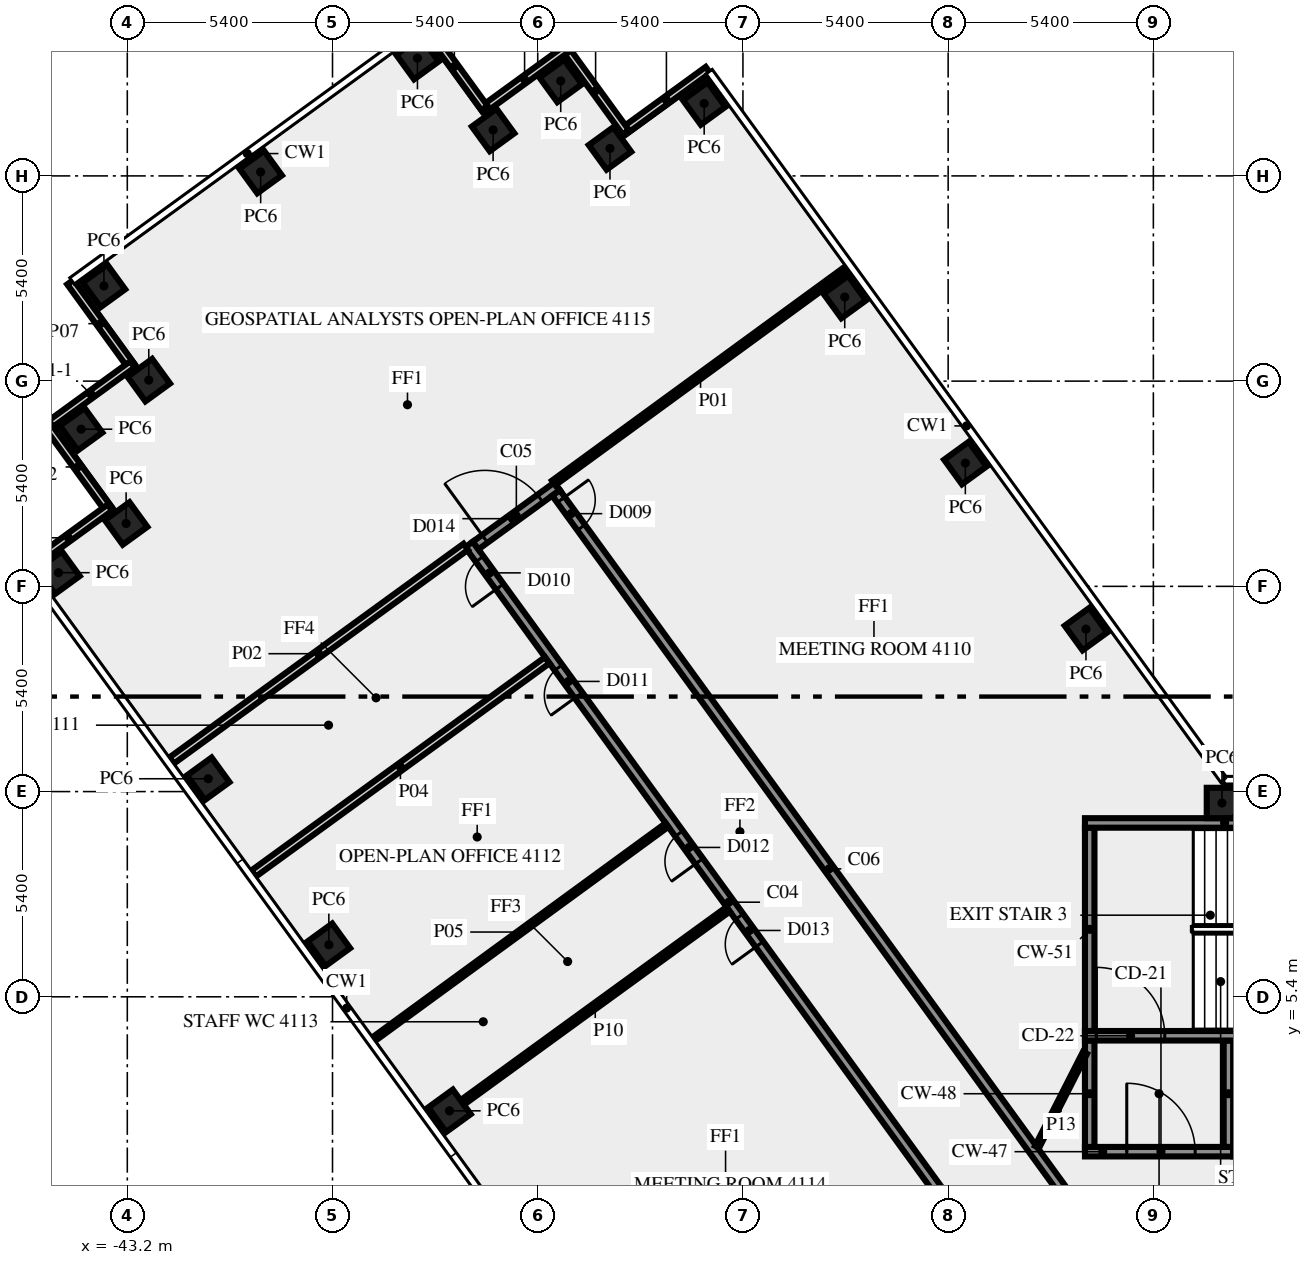
"""IFC4 building model, lengths in metres.
Left out: names, types, materials, properties, quantities, classifications, styles, units other than length and angle.
Written with IfcOpenShell. Run it as: python <this file> out.ifc"""

import sys

from ifc_helpers import new_model, si_unit, direction, frame, frame_2d, origin, origin_2d, place, context, subcontext, project, spatial, rectangle, extrude, element, fill, save


model = new_model("IFC4")
c1 = context("Model", 3, precision=1e-05, world=origin(), true_north=direction((0.0, 1.0)))
c2 = subcontext(c1, "Body", "Model", "MODEL_VIEW")
j1 = project(units=[si_unit("LENGTHUNIT", "METRE"), si_unit("PLANEANGLEUNIT", "RADIAN")], contexts=[c1])
p1 = place(None, origin())
s1 = spatial("IfcSite", under=j1, at=p1, CompositionType="ELEMENT")
p2 = place(p1, origin())
s2 = spatial("IfcBuilding", under=s1, at=p2, CompositionType="ELEMENT")
p3 = place(p2, frame((0.0, 0.0, 176.0)))
s3 = spatial("IfcBuildingStorey", under=s2, at=p3, CompositionType="ELEMENT", Elevation=176.0)
for number, where, z_axis, x_axis in (
    (1, (-17.974, 15.075, 0.0), (0.0, 0.0, 1.0), (-0.588, 0.809, 0.0)),
    (2, (-21.147, 19.444, 0.0), (0.0, 0.0, 1.0), (-0.588, 0.809, 0.0)),
    (3, (-24.321, 23.812, 0.0), (0.0, 0.0, 1.0), (-0.588, 0.809, 0.0)),
    (4, (-28.02, 28.905, 0.0), (0.0, 0.0, 1.0), (-0.809, -0.588, 0.0)),
    (5, (-30.499, 27.723, 0.0), (0.0, 0.0, 1.0), (-0.809, -0.588, 0.0)),
    (6, (-31.795, 29.5, 0.0), (0.0, 0.0, 1.0), (-0.588, 0.809, 0.0)),
    (7, (-33.574, 28.209, 0.0), (0.0, 0.0, 1.0), (-0.588, 0.809, 0.0)),
    (8, (-35.565, 30.1, 0.0), (0.0, 0.0, 1.0), (-0.809, -0.588, 0.0)),
    (9, (-39.691, 27.102, 0.0), (0.0, 0.0, 1.0), (-0.809, -0.588, 0.0)),
    (10, (-43.815, 24.105, 0.0), (0.0, 0.0, 1.0), (-0.809, -0.588, 0.0)),
    (11, (-42.635, 21.626, 0.0), (0.0, 0.0, 1.0), (-0.809, -0.588, 0.0)),
    (12, (-44.415, 20.335, 0.0), (0.0, 0.0, 1.0), (0.588, -0.809, 0.0)),
    (13, (-43.231, 17.854, 0.0), (0.0, 0.0, 1.0), (0.588, -0.809, 0.0)),
    (14, (-45.01, 16.56, 0.0), (0.0, 0.0, 1.0), (0.588, -0.809, 0.0)),
    (15, (-41.07, 11.137, 0.0), (0.0, 0.0, 1.0), (0.588, -0.809, 0.0)),
    (16, (-37.896, 6.769, 0.0), (0.0, 0.0, 1.0), (0.588, -0.809, 0.0)),
    (17, (-34.722, 2.4, 0.0), (0.0, 0.0, 1.0), (0.588, -0.809, 0.0)),
    (18, (-14.395, 10.5, 0.0), (0.0, 0.0, 1.0), (-1.0, 0.0, 0.0)),
):
    element("IfcColumn", number, at=place(p3, frame(where, z_axis=z_axis, x_axis=x_axis)), inside=s3, PredefinedType="COLUMN", context=c2, shape_type="SweptSolid", body=[
        extrude(rectangle(XDim=0.8, YDim=0.8, at=origin_2d()), origin(), (0.0, 0.0, 1.0), 3.65),
    ])
for number, where, z_axis, x_axis in (
    (19, (-27.921, 29.787, 0.0), (0.0, 0.0, 1.0), (-0.809, -0.588, 0.0)),
    (20, (-30.083, 28.149, 0.0), (0.0, 0.0, 1.0), (-0.588, 0.809, 0.0)),
    (21, (-31.654, 30.331, 0.0), (0.0, 0.0, 1.0), (-0.809, -0.588, 0.0)),
    (22, (-33.801, 28.786, 0.0), (0.0, 0.0, 1.0), (-0.588, 0.809, 0.0)),
    (23, (-44.699, 24.205, 0.0), (0.0, 0.0, 1.0), (0.588, -0.809, 0.0)),
    (24, (-43.061, 22.043, 0.0), (0.0, 0.0, 1.0), (-0.809, -0.588, 0.0)),
    (25, (-45.296, 20.434, 0.0), (0.0, 0.0, 1.0), (0.588, -0.809, 0.0)),
    (26, (-43.658, 18.272, 0.0), (0.0, 0.0, 1.0), (-0.809, -0.588, 0.0)),
):
    element("IfcWall", number, at=place(p3, frame(where, z_axis=z_axis, x_axis=x_axis)), inside=s3, PredefinedType="SOLIDWALL", context=c2, shape_type="SweptSolid", body=[
        extrude(rectangle(XDim=2.7, YDim=0.2, at=frame_2d((1.35, 0.0))), origin(), (0.0, 0.0, 1.0), 3.65),
    ])
p4 = place(p3, frame((-18.0, 1.325, 0.0), z_axis=(0.0, 0.0, 1.0), x_axis=(1.0, 0.0, 0.0)))
e27 = element("IfcWall", 27, at=p4, inside=s3, PredefinedType="SHEAR", context=c2, shape_type="SweptSolid", body=[
    extrude(rectangle(XDim=3.9, YDim=0.25, at=frame_2d((1.95, 0.0))), origin(), (0.0, 0.0, 1.0), 3.65),
])
p5 = place(p4, frame((1.1, 0.0, 0.0)))
e28 = element("IfcOpeningElement", 28, at=p5, cuts=e27, PredefinedType="OPENING", context=c2, shape_type="SweptSolid", body=[
    extrude(rectangle(XDim=1.8, YDim=2.1, at=frame_2d((0.9, 1.05))), frame((0.0, 0.135, 0.0), z_axis=(0.0, -1.0, 0.0), x_axis=(1.0, 0.0, 0.0)), (0.0, 0.0, 1.0), 0.27),
])
for number, where, z_axis, x_axis in (
    (29, (-17.875, 1.45, 0.0), (0.0, 0.0, 1.0), (0.0, 1.0, 0.0)),
    (30, (-14.225, 1.45, 0.0), (0.0, 0.0, 1.0), (0.0, 1.0, 0.0)),
):
    element("IfcWall", number, at=place(p3, frame(where, z_axis=z_axis, x_axis=x_axis)), inside=s3, PredefinedType="SHEAR", context=c2, shape_type="SweptSolid", body=[
        extrude(rectangle(XDim=2.8, YDim=0.25, at=frame_2d((1.4, 0.0))), origin(), (0.0, 0.0, 1.0), 3.65),
    ])
p6 = place(p3, frame((-18.0, 4.375, 0.0), z_axis=(0.0, 0.0, 1.0), x_axis=(1.0, 0.0, 0.0)))
e31 = element("IfcWall", 31, at=p6, inside=s3, PredefinedType="SHEAR", context=c2, shape_type="SweptSolid", body=[
    extrude(rectangle(XDim=10.5, YDim=0.25, at=frame_2d((5.25, 0.0))), origin(), (0.0, 0.0, 1.0), 3.65),
])
p7 = place(p6, frame((0.3, 0.0, 0.0)))
e32 = element("IfcOpeningElement", 32, at=p7, cuts=e31, PredefinedType="OPENING", context=c2, shape_type="SweptSolid", body=[
    extrude(rectangle(XDim=1.8, YDim=2.1, at=frame_2d((0.9, 1.05))), frame((0.0, 0.135, 0.0), z_axis=(0.0, -1.0, 0.0), x_axis=(1.0, 0.0, 0.0)), (0.0, 0.0, 1.0), 0.27),
])
p8 = place(p3, frame((-17.875, 4.5, 0.0), z_axis=(0.0, 0.0, 1.0), x_axis=(0.0, 1.0, 0.0)))
e33 = element("IfcWall", 33, at=p8, inside=s3, PredefinedType="SHEAR", context=c2, shape_type="SweptSolid", body=[
    extrude(rectangle(XDim=5.35, YDim=0.25, at=frame_2d((2.675, 0.0))), origin(), (0.0, 0.0, 1.0), 3.65),
])
p9 = place(p3, frame((-18.0, 9.975, 0.0), z_axis=(0.0, 0.0, 1.0), x_axis=(1.0, 0.0, 0.0)))
e34 = element("IfcWall", 34, at=p9, inside=s3, PredefinedType="SHEAR", context=c2, shape_type="SweptSolid", body=[
    extrude(rectangle(XDim=10.5, YDim=0.25, at=frame_2d((5.25, 0.0))), origin(), (0.0, 0.0, 1.0), 3.65),
])
p10 = place(p9, frame((4.5, 0.0, 1.0)))
e35 = element("IfcOpeningElement", 35, at=p10, cuts=e34, PredefinedType="OPENING", context=c2, shape_type="SweptSolid", body=[
    extrude(rectangle(XDim=1.2, YDim=1.2, at=frame_2d((0.6, 0.6))), frame((0.0, 0.135, 0.0), z_axis=(0.0, -1.0, 0.0), x_axis=(1.0, 0.0, 0.0)), (0.0, 0.0, 1.0), 0.27),
])
p11 = place(p3, frame((-20.531, -1.523, 0.0), z_axis=(0.0, 0.0, 1.0), x_axis=(-0.587784239999, 0.809017729849, 0.0)))
e36 = element("IfcWall", 36, at=p11, inside=s3, PredefinedType="SOLIDWALL", context=c2, shape_type="SweptSolid", body=[
    extrude(rectangle(XDim=23.271, YDim=0.25, at=frame_2d((11.635, 0.0))), origin(), (0.0, 0.0, 1.0), 3.65),
])
p12 = place(p11, frame((18.366, 0.0, 0.0)))
e37 = element("IfcOpeningElement", 37, at=p12, cuts=e36, PredefinedType="OPENING", context=c2, shape_type="SweptSolid", body=[
    extrude(rectangle(XDim=0.9, YDim=2.1, at=frame_2d((0.45, 1.05))), frame((0.0, 0.135, 0.0), z_axis=(0.0, -1.0, 0.0), x_axis=(1.0, 0.0, 0.0)), (0.0, 0.0, 1.0), 0.27),
])
p13 = place(p11, frame((10.266, 0.0, 0.0)))
e38 = element("IfcOpeningElement", 38, at=p13, cuts=e36, PredefinedType="OPENING", context=c2, shape_type="SweptSolid", body=[
    extrude(rectangle(XDim=0.9, YDim=2.1, at=frame_2d((0.45, 1.05))), frame((0.0, 0.135, 0.0), z_axis=(0.0, -1.0, 0.0), x_axis=(1.0, 0.0, 0.0)), (0.0, 0.0, 1.0), 0.27),
])
p14 = place(p11, frame((21.896, 0.0, 0.0)))
e39 = element("IfcOpeningElement", 39, at=p14, cuts=e36, PredefinedType="OPENING", context=c2, shape_type="SweptSolid", body=[
    extrude(rectangle(XDim=0.9, YDim=2.1, at=frame_2d((0.45, 1.05))), frame((0.0, 0.135, 0.0), z_axis=(0.0, -1.0, 0.0), x_axis=(1.0, 0.0, 0.0)), (0.0, 0.0, 1.0), 0.27),
])
p15 = place(p11, frame((12.966, 0.0, 0.0)))
e40 = element("IfcOpeningElement", 40, at=p15, cuts=e36, PredefinedType="OPENING", context=c2, shape_type="SweptSolid", body=[
    extrude(rectangle(XDim=0.9, YDim=2.1, at=frame_2d((0.45, 1.05))), frame((0.0, 0.135, 0.0), z_axis=(0.0, -1.0, 0.0), x_axis=(1.0, 0.0, 0.0)), (0.0, 0.0, 1.0), 0.27),
])
p16 = place(p3, frame((-34.034, 17.275, 0.0), z_axis=(0.0, 0.0, 1.0), x_axis=(0.809006914995, 0.587799125119, 0.0)))
e41 = element("IfcWall", 41, at=p16, inside=s3, PredefinedType="SOLIDWALL", context=c2, shape_type="SweptSolid", body=[
    extrude(rectangle(XDim=2.65, YDim=0.25, at=frame_2d((1.325, 0.0))), origin(), (0.0, 0.0, 1.0), 3.65),
])
p17 = place(p16, frame((0.3, 0.0, 0.0)))
e42 = element("IfcOpeningElement", 42, at=p17, cuts=e41, PredefinedType="OPENING", context=c2, shape_type="SweptSolid", body=[
    extrude(rectangle(XDim=1.8, YDim=2.1, at=frame_2d((0.9, 1.05))), frame((0.0, 0.135, 0.0), z_axis=(0.0, -1.0, 0.0), x_axis=(1.0, 0.0, 0.0)), (0.0, 0.0, 1.0), 0.27),
])
p18 = place(p3, frame((-31.918, 18.658, 0.0), z_axis=(0.0, 0.0, 1.0), x_axis=(0.587788731405, -0.80901446664, 0.0)))
e43 = element("IfcWall", 43, at=p18, inside=s3, PredefinedType="SOLIDWALL", context=c2, shape_type="SweptSolid", body=[
    extrude(rectangle(XDim=24.453, YDim=0.25, at=frame_2d((12.227, 0.0))), origin(), (0.0, 0.0, 1.0), 3.65),
])
p19 = place(p18, frame((0.224, 0.0, 0.0)))
e44 = element("IfcOpeningElement", 44, at=p19, cuts=e43, PredefinedType="OPENING", context=c2, shape_type="SweptSolid", body=[
    extrude(rectangle(XDim=0.9, YDim=2.1, at=frame_2d((0.45, 1.05))), frame((0.0, 0.135, 0.0), z_axis=(0.0, -1.0, 0.0), x_axis=(1.0, 0.0, 0.0)), (0.0, 0.0, 1.0), 0.27),
])
p20 = place(p3, frame((-31.98, 18.922, 0.0), z_axis=(0.0, 0.0, 1.0), x_axis=(0.807588329082, 0.589746632657, 0.0)))
e45 = element("IfcWall", 45, at=p20, inside=s3, PredefinedType="PARTITIONING", context=c2, shape_type="SweptSolid", body=[
    extrude(rectangle(XDim=9.57, YDim=0.15, at=frame_2d((4.785, 0.0))), origin(), (0.0, 0.0, 1.0), 2.85),
])
p21 = place(p3, frame((-42.036, 11.615, 0.0), z_axis=(0.0, 0.0, 1.0), x_axis=(0.808985331811, 0.587828829605, 0.0)))
e46 = element("IfcWall", 46, at=p21, inside=s3, PredefinedType="SOLIDWALL", context=c2, shape_type="SweptSolid", body=[
    extrude(rectangle(XDim=9.57, YDim=0.2, at=frame_2d((4.785, 0.0))), origin(), (0.0, 0.0, 1.0), 2.85),
])
p22 = place(p3, frame((-32.15, 14.256, 0.0), z_axis=(0.0, 0.0, 1.0), x_axis=(-0.809064299351, -0.587720137068, 0.0)))
e47 = element("IfcWall", 47, at=p22, inside=s3, PredefinedType="SOLIDWALL", context=c2, shape_type="SweptSolid", body=[
    extrude(rectangle(XDim=9.55, YDim=0.2, at=frame_2d((4.775, 0.0))), origin(), (0.0, 0.0, 1.0), 2.85),
])
p23 = place(p3, frame((-36.712, 4.288, 0.0), z_axis=(0.0, 0.0, 1.0), x_axis=(0.807606997933, 0.589721067023, 0.0)))
e48 = element("IfcWall", 48, at=p23, inside=s3, PredefinedType="PARTITIONING", context=c2, shape_type="SweptSolid", body=[
    extrude(rectangle(XDim=9.55, YDim=0.12, at=frame_2d((4.775, 0.0))), origin(), (0.0, 0.0, 1.0), 2.85),
])
p24 = place(p3, frame((-27.389, 7.703, 0.0), z_axis=(0.0, 0.0, 1.0), x_axis=(-0.809060825193, -0.587724919617, 0.0)))
e49 = element("IfcWall", 49, at=p24, inside=s3, PredefinedType="PARTITIONING", context=c2, shape_type="SweptSolid", body=[
    extrude(rectangle(XDim=8.645, YDim=0.15, at=frame_2d((4.322, 0.0))), origin(), (0.0, 0.0, 1.0), 3.65),
])
p25 = place(p3, frame((-19.261, 1.45, 0.0), z_axis=(0.0, 0.0, 1.0), x_axis=(0.453950796792, 0.891026752736, 0.0)))
e50 = element("IfcWall", 50, at=p25, inside=s3, PredefinedType="PARTITIONING", context=c2, shape_type="SweptSolid", body=[
    extrude(rectangle(XDim=2.778, YDim=0.12, at=frame_2d((1.389, 0.0))), origin(), (0.0, 0.0, 1.0), 3.65),
])
p26 = place(p5, origin())
e51 = element("IfcDoor", 51, at=p26, inside=s3, OperationType="DOUBLE_DOOR_SINGLE_SWING", PredefinedType="DOOR", context=c2, shape_type="SweptSolid", body=[
    extrude(rectangle(XDim=1.8, YDim=2.1, at=frame_2d((0.9, 1.05))), frame((0.0, 0.025, 0.0), z_axis=(0.0, -1.0, 0.0), x_axis=(1.0, 0.0, 0.0)), (0.0, 0.0, 1.0), 0.05),
])
fill(e28, e51)
p27 = place(p7, origin())
e52 = element("IfcDoor", 52, at=p27, inside=s3, OperationType="DOUBLE_DOOR_SINGLE_SWING", PredefinedType="DOOR", context=c2, shape_type="SweptSolid", body=[
    extrude(rectangle(XDim=1.8, YDim=2.1, at=frame_2d((0.9, 1.05))), frame((0.0, 0.025, 0.0), z_axis=(0.0, -1.0, 0.0), x_axis=(1.0, 0.0, 0.0)), (0.0, 0.0, 1.0), 0.05),
])
fill(e32, e52)
p28 = place(p17, origin())
e53 = element("IfcDoor", 53, at=p28, inside=s3, OperationType="DOUBLE_DOOR_SINGLE_SWING", PredefinedType="DOOR", context=c2, shape_type="SweptSolid", body=[
    extrude(rectangle(XDim=1.8, YDim=2.1, at=frame_2d((0.9, 1.05))), frame((0.0, 0.025, 0.0), z_axis=(0.0, -1.0, 0.0), x_axis=(1.0, 0.0, 0.0)), (0.0, 0.0, 1.0), 0.05),
])
fill(e42, e53)
p29 = place(p12, origin())
e54 = element("IfcDoor", 54, at=p29, inside=s3, OperationType="SINGLE_SWING_RIGHT", PredefinedType="DOOR", context=c2, shape_type="SweptSolid", body=[
    extrude(rectangle(XDim=0.9, YDim=2.1, at=frame_2d((0.45, 1.05))), frame((0.0, 0.025, 0.0), z_axis=(0.0, -1.0, 0.0), x_axis=(1.0, 0.0, 0.0)), (0.0, 0.0, 1.0), 0.05),
])
fill(e37, e54)
p30 = place(p19, origin())
e55 = element("IfcDoor", 55, at=p30, inside=s3, OperationType="SINGLE_SWING_LEFT", PredefinedType="DOOR", context=c2, shape_type="SweptSolid", body=[
    extrude(rectangle(XDim=0.9, YDim=2.1, at=frame_2d((0.45, 1.05))), frame((0.0, 0.025, 0.0), z_axis=(0.0, -1.0, 0.0), x_axis=(1.0, 0.0, 0.0)), (0.0, 0.0, 1.0), 0.05),
])
fill(e44, e55)
p31 = place(p13, origin())
e56 = element("IfcDoor", 56, at=p31, inside=s3, OperationType="SINGLE_SWING_RIGHT", PredefinedType="DOOR", context=c2, shape_type="SweptSolid", body=[
    extrude(rectangle(XDim=0.9, YDim=2.1, at=frame_2d((0.45, 1.05))), frame((0.0, 0.025, 0.0), z_axis=(0.0, -1.0, 0.0), x_axis=(1.0, 0.0, 0.0)), (0.0, 0.0, 1.0), 0.05),
])
fill(e38, e56)
p32 = place(p14, origin())
e57 = element("IfcDoor", 57, at=p32, inside=s3, OperationType="SINGLE_SWING_RIGHT", PredefinedType="DOOR", context=c2, shape_type="SweptSolid", body=[
    extrude(rectangle(XDim=0.9, YDim=2.1, at=frame_2d((0.45, 1.05))), frame((0.0, 0.025, 0.0), z_axis=(0.0, -1.0, 0.0), x_axis=(1.0, 0.0, 0.0)), (0.0, 0.0, 1.0), 0.05),
])
fill(e39, e57)
p33 = place(p15, origin())
e58 = element("IfcDoor", 58, at=p33, inside=s3, OperationType="SINGLE_SWING_RIGHT", PredefinedType="DOOR", context=c2, shape_type="SweptSolid", body=[
    extrude(rectangle(XDim=0.9, YDim=2.1, at=frame_2d((0.45, 1.05))), frame((0.0, 0.025, 0.0), z_axis=(0.0, -1.0, 0.0), x_axis=(1.0, 0.0, 0.0)), (0.0, 0.0, 1.0), 0.05),
])
fill(e40, e58)
save(model, sys.argv[1])
